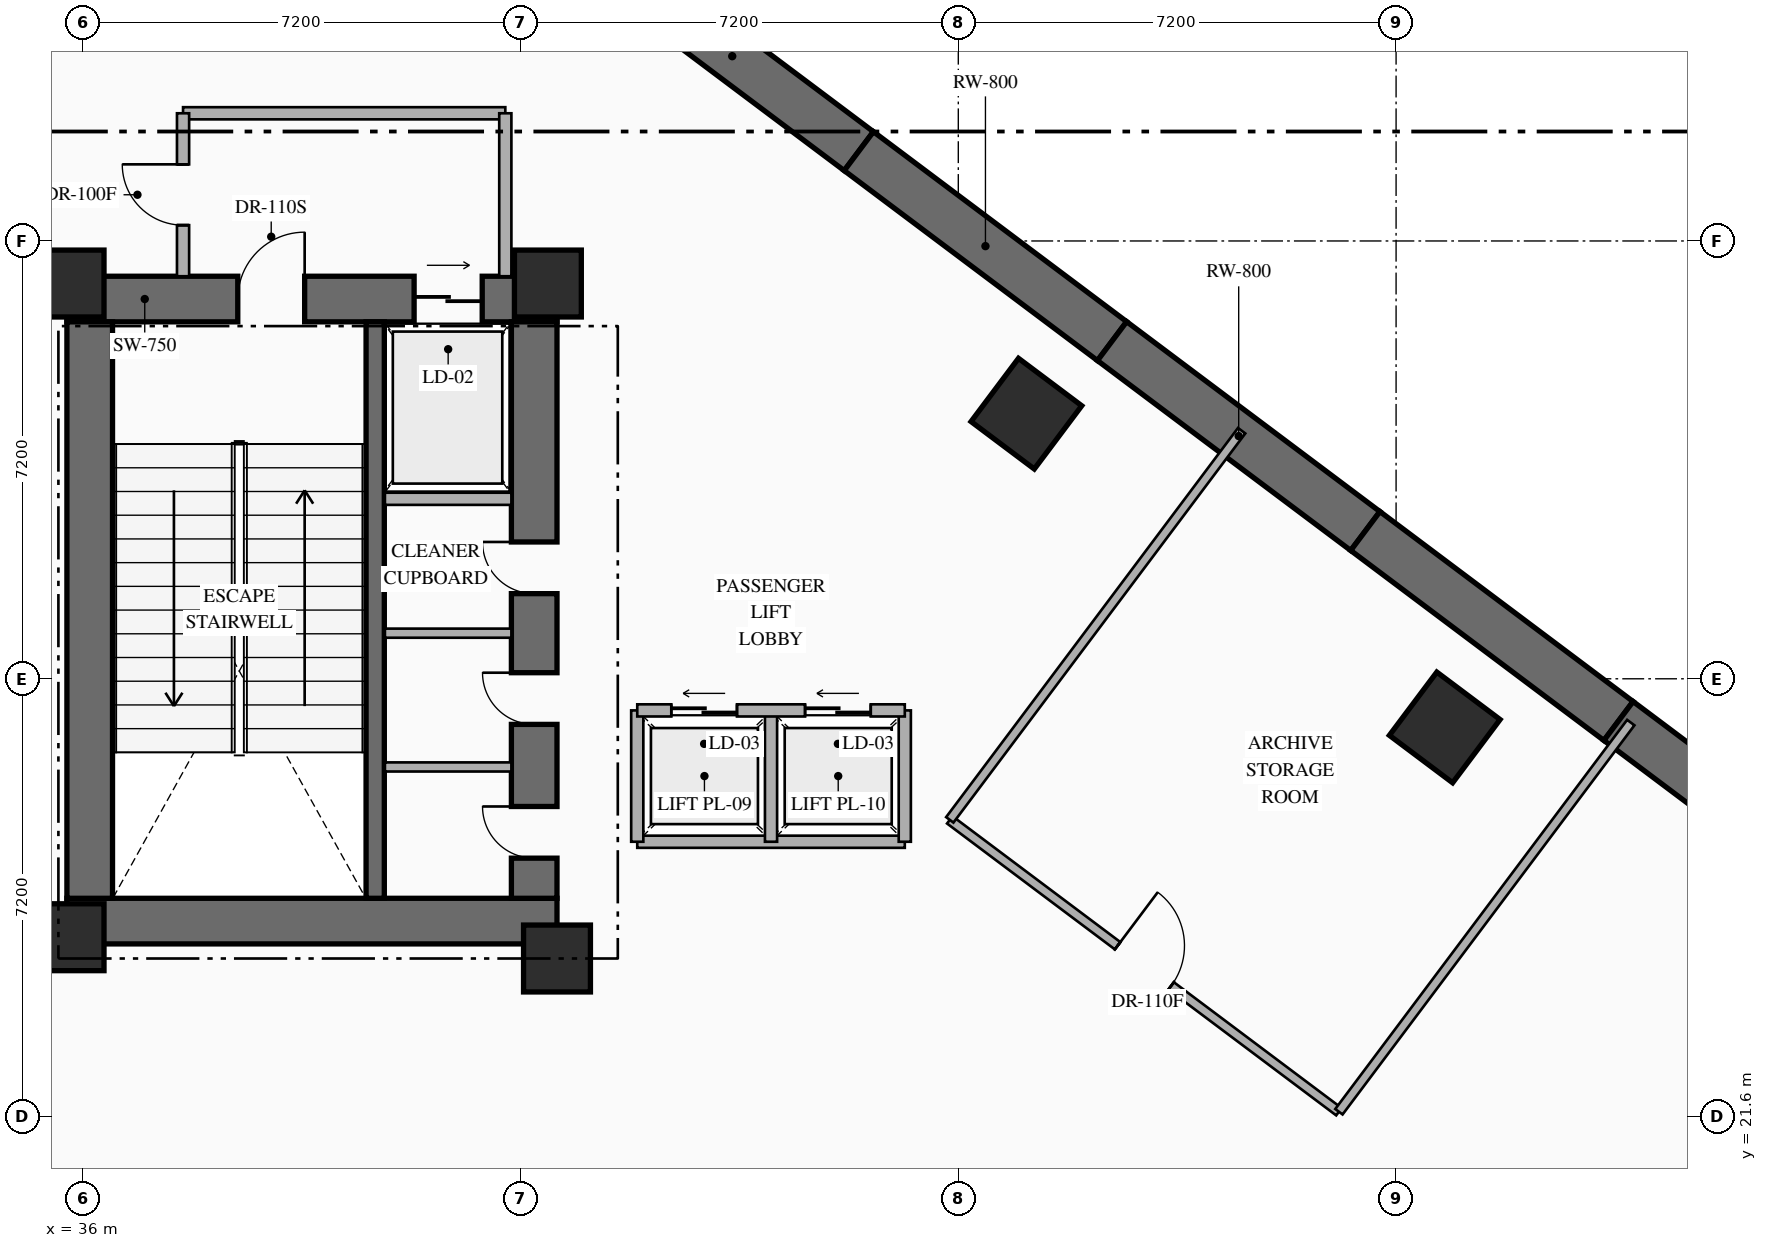
"""IFC4 building model, lengths in metres.
Left out: names, types, materials, properties, quantities, classifications, styles, units other than length and angle.
Written with IfcOpenShell. Run it as: python <this file> out.ifc"""

import sys

from ifc_helpers import new_model, si_unit, direction, frame, frame_2d, origin, origin_2d, place, context, subcontext, project, spatial, rectangle, extrude, element, fill, save


model = new_model("IFC4")
c1 = context("Model", 3, precision=1e-05, world=origin(), true_north=direction((0.0, 1.0)))
c2 = subcontext(c1, "Body", "Model", "MODEL_VIEW")
j1 = project(units=[si_unit("LENGTHUNIT", "METRE"), si_unit("PLANEANGLEUNIT", "RADIAN")], contexts=[c1])
p1 = place(None, origin())
s1 = spatial("IfcSite", under=j1, at=p1, CompositionType="ELEMENT")
p2 = place(p1, origin())
s2 = spatial("IfcBuilding", under=s1, at=p2, CompositionType="ELEMENT")
p3 = place(p2, frame((0.0, 0.0, -4.8)))
s3 = spatial("IfcBuildingStorey", under=s2, at=p3, CompositionType="ELEMENT", Elevation=-4.8)
p4 = place(p3, frame((35.74, 24.815, 0.0), z_axis=(0.0, 0.0, 1.0), x_axis=(1.0, 0.0, 0.0)))
e1 = element("IfcWall", 1, at=p4, inside=s3, PredefinedType="SHEAR", context=c2, shape_type="SweptSolid", body=[
    extrude(rectangle(XDim=8.06, YDim=0.75, at=frame_2d((4.03, 0.0))), origin(), (0.0, 0.0, 1.0), 4.8),
])
p5 = place(p3, frame((35.74, 35.045, 0.0), z_axis=(0.0, 0.0, 1.0), x_axis=(1.0, 0.0, 0.0)))
e2 = element("IfcWall", 2, at=p5, inside=s3, PredefinedType="SHEAR", context=c2, shape_type="SweptSolid", body=[
    extrude(rectangle(XDim=8.06, YDim=0.75, at=frame_2d((4.03, 0.0))), origin(), (0.0, 0.0, 1.0), 4.8),
])
p6 = place(p5, frame((2.81, 0.0, 0.0)))
e3 = element("IfcOpeningElement", 3, at=p6, cuts=e2, PredefinedType="OPENING", context=c2, shape_type="SweptSolid", body=[
    extrude(rectangle(XDim=1.1, YDim=2.2, at=frame_2d((0.55, 1.1))), frame((0.0, 0.385, 0.0), z_axis=(0.0, -1.0, 0.0), x_axis=(1.0, 0.0, 0.0)), (0.0, 0.0, 1.0), 0.77),
])
p7 = place(p5, frame((5.71, 0.0, 0.0)))
e4 = element("IfcOpeningElement", 4, at=p7, cuts=e2, PredefinedType="OPENING", context=c2, shape_type="SweptSolid", body=[
    extrude(rectangle(XDim=1.12, YDim=2.15, at=frame_2d((0.56, 1.075))), frame((0.0, 0.385, 0.0), z_axis=(0.0, -1.0, 0.0), x_axis=(1.0, 0.0, 0.0)), (0.0, 0.0, 1.0), 0.77),
])
p8 = place(p3, frame((36.115, 25.19, 0.0), z_axis=(0.0, 0.0, 1.0), x_axis=(0.0, 1.0, 0.0)))
e5 = element("IfcWall", 5, at=p8, inside=s3, PredefinedType="SHEAR", context=c2, shape_type="SweptSolid", body=[
    extrude(rectangle(XDim=9.48, YDim=0.75, at=frame_2d((4.74, 0.0))), origin(), (0.0, 0.0, 1.0), 4.8),
])
p9 = place(p3, frame((43.425, 25.19, 0.0), z_axis=(0.0, 0.0, 1.0), x_axis=(0.0, 1.0, 0.0)))
e6 = element("IfcWall", 6, at=p9, inside=s3, PredefinedType="SHEAR", context=c2, shape_type="SweptSolid", body=[
    extrude(rectangle(XDim=9.48, YDim=0.75, at=frame_2d((4.74, 0.0))), origin(), (0.0, 0.0, 1.0), 4.8),
])
p10 = place(p9, frame((0.66, 0.0, 0.0)))
e7 = element("IfcOpeningElement", 7, at=p10, cuts=e6, PredefinedType="OPENING", context=c2, shape_type="SweptSolid", body=[
    extrude(rectangle(XDim=0.85, YDim=2.08, at=frame_2d((0.425, 1.04))), frame((0.0, 0.385, 0.0), z_axis=(0.0, -1.0, 0.0), x_axis=(1.0, 0.0, 0.0)), (0.0, 0.0, 1.0), 0.77),
])
p11 = place(p9, frame((2.86, 0.0, 0.0)))
e8 = element("IfcOpeningElement", 8, at=p11, cuts=e6, PredefinedType="OPENING", context=c2, shape_type="SweptSolid", body=[
    extrude(rectangle(XDim=0.85, YDim=2.08, at=frame_2d((0.425, 1.04))), frame((0.0, 0.385, 0.0), z_axis=(0.0, -1.0, 0.0), x_axis=(1.0, 0.0, 0.0)), (0.0, 0.0, 1.0), 0.77),
])
p12 = place(p9, frame((5.01, 0.0, 0.0)))
e9 = element("IfcOpeningElement", 9, at=p12, cuts=e6, PredefinedType="OPENING", context=c2, shape_type="SweptSolid", body=[
    extrude(rectangle(XDim=0.85, YDim=2.08, at=frame_2d((0.425, 1.04))), frame((0.0, 0.385, 0.0), z_axis=(0.0, -1.0, 0.0), x_axis=(1.0, 0.0, 0.0)), (0.0, 0.0, 1.0), 0.77),
])
p13 = place(p3, frame((40.81, 25.19, 0.0), z_axis=(0.0, 0.0, 1.0), x_axis=(0.0, 1.0, 0.0)))
e10 = element("IfcWall", 10, at=p13, inside=s3, PredefinedType="SHEAR", context=c2, shape_type="SweptSolid", body=[
    extrude(rectangle(XDim=9.48, YDim=0.3, at=frame_2d((4.74, 0.0))), origin(), (0.0, 0.0, 1.0), 4.8),
])
p14 = place(p3, frame((44.6, 40.6, 0.0), z_axis=(0.0, 0.0, 1.0), x_axis=(0.799983113496, -0.600022514679, 0.0)))
e11 = element("IfcWall", 11, at=p14, inside=s3, PredefinedType="SHEAR", context=c2, shape_type="SweptSolid", body=[
    extrude(rectangle(XDim=5.205, YDim=0.8, at=frame_2d((2.603, 0.0))), origin(), (0.0, 0.0, 1.0), 4.5),
])
p15 = place(p3, frame((48.764, 37.477, 0.0), z_axis=(0.0, 0.0, 1.0), x_axis=(0.799977491278, -0.600030010457, 0.0)))
e12 = element("IfcWall", 12, at=p15, inside=s3, PredefinedType="SHEAR", context=c2, shape_type="SweptSolid", body=[
    extrude(rectangle(XDim=5.207, YDim=0.8, at=frame_2d((2.603, 0.0))), origin(), (0.0, 0.0, 1.0), 4.5),
])
p16 = place(p3, frame((52.929, 34.353, 0.0), z_axis=(0.0, 0.0, 1.0), x_axis=(0.80006752701, -0.59990995343, 0.0)))
e13 = element("IfcWall", 13, at=p16, inside=s3, PredefinedType="SHEAR", context=c2, shape_type="SweptSolid", body=[
    extrude(rectangle(XDim=5.206, YDim=0.8, at=frame_2d((2.603, 0.0))), origin(), (0.0, 0.0, 1.0), 4.5),
])
p17 = place(p3, frame((57.094, 31.23, 0.0), z_axis=(0.0, 0.0, 1.0), x_axis=(0.799909944843, -0.600120054773, 0.0)))
e14 = element("IfcWall", 14, at=p17, inside=s3, PredefinedType="SHEAR", context=c2, shape_type="SweptSolid", body=[
    extrude(rectangle(XDim=5.206, YDim=0.8, at=frame_2d((2.603, 0.0))), origin(), (0.0, 0.0, 1.0), 4.5),
])
p18 = place(p3, frame((61.258, 28.106, 0.0), z_axis=(0.0, 0.0, 1.0), x_axis=(0.8, -0.6, 0.0)))
e15 = element("IfcWall", 15, at=p18, inside=s3, PredefinedType="SHEAR", context=c2, shape_type="SweptSolid", body=[
    extrude(rectangle(XDim=5.205, YDim=0.8, at=frame_2d((2.603, 0.0))), origin(), (0.0, 0.0, 1.0), 4.5),
])
for number, where, z_axis, x_axis in (
    (16, (35.8, 24.55, 0.0), (0.0, 0.0, 1.0), (1.0, 0.0, 0.0)),
    (17, (43.8, 24.2, 0.0), (0.0, 0.0, 1.0), (1.0, 0.0, 0.0)),
    (18, (35.8, 35.3, 0.0), (0.0, 0.0, 1.0), (1.0, 0.0, 0.0)),
    (19, (43.65, 35.3, 0.0), (0.0, 0.0, 1.0), (1.0, 0.0, 0.0)),
):
    element("IfcColumn", number, at=place(p3, frame(where, z_axis=z_axis, x_axis=x_axis)), inside=s3, PredefinedType="COLUMN", context=c2, shape_type="SweptSolid", body=[
        extrude(rectangle(XDim=1.1, YDim=1.1, at=origin_2d()), origin(), (0.0, 0.0, 1.0), 4.8),
    ])
for number, where, z_axis, x_axis in (
    (20, (51.52, 33.16, 0.0), (0.0, 0.0, 1.0), (0.8, -0.6, 0.0)),
    (21, (58.4, 28.0, 0.0), (0.0, 0.0, 1.0), (0.8, -0.6, 0.0)),
):
    element("IfcColumn", number, at=place(p3, frame(where, z_axis=z_axis, x_axis=x_axis)), inside=s3, PredefinedType="COLUMN", context=c2, shape_type="SweptSolid", body=[
        extrude(rectangle(XDim=1.3, YDim=1.3, at=origin_2d()), origin(), (0.0, 0.0, 1.0), 4.8),
    ])
p19 = place(p3, frame((40.97, 31.76, 0.0), z_axis=(0.0, 0.0, 1.0), x_axis=(1.0, 0.0, 0.0)))
e22 = element("IfcWall", 22, at=p19, inside=s3, PredefinedType="STANDARD", context=c2, shape_type="SweptSolid", body=[
    extrude(rectangle(XDim=2.08, YDim=0.2, at=frame_2d((1.04, 0.0))), origin(), (0.0, 0.0, 1.0), 4.5),
])
for number, where, z_axis, x_axis in (
    (23, (40.97, 27.35, 0.0), (0.0, 0.0, 1.0), (1.0, 0.0, 0.0)),
    (24, (40.97, 29.55, 0.0), (0.0, 0.0, 1.0), (1.0, 0.0, 0.0)),
):
    element("IfcWall", number, at=place(p3, frame(where, z_axis=z_axis, x_axis=x_axis)), inside=s3, PredefinedType="PARTITIONING", context=c2, shape_type="SweptSolid", body=[
        extrude(rectangle(XDim=2.08, YDim=0.15, at=frame_2d((1.04, 0.0))), origin(), (0.0, 0.0, 1.0), 4.5),
    ])
p20 = place(p3, frame((37.65, 38.1, 0.0), z_axis=(0.0, 0.0, 1.0), x_axis=(1.0, 0.0, 0.0)))
e25 = element("IfcWall", 25, at=p20, inside=s3, PredefinedType="STANDARD", context=c2, shape_type="SweptSolid", body=[
    extrude(rectangle(XDim=5.3, YDim=0.2, at=frame_2d((2.65, 0.0))), origin(), (0.0, 0.0, 1.0), 4.5),
])
p21 = place(p3, frame((42.95, 35.42, 0.0), z_axis=(0.0, 0.0, 1.0), x_axis=(0.0, 1.0, 0.0)))
e26 = element("IfcWall", 26, at=p21, inside=s3, PredefinedType="STANDARD", context=c2, shape_type="SweptSolid", body=[
    extrude(rectangle(XDim=2.68, YDim=0.2, at=frame_2d((1.34, 0.0))), origin(), (0.0, 0.0, 1.0), 4.5),
])
p22 = place(p3, frame((37.65, 35.42, 0.0), z_axis=(0.0, 0.0, 1.0), x_axis=(0.0, 1.0, 0.0)))
e27 = element("IfcWall", 27, at=p22, inside=s3, PredefinedType="STANDARD", context=c2, shape_type="SweptSolid", body=[
    extrude(rectangle(XDim=2.68, YDim=0.2, at=frame_2d((1.34, 0.0))), origin(), (0.0, 0.0, 1.0), 4.5),
])
p23 = place(p22, frame((0.84, 0.0, 0.0)))
e28 = element("IfcOpeningElement", 28, at=p23, cuts=e27, PredefinedType="OPENING", context=c2, shape_type="SweptSolid", body=[
    extrude(rectangle(XDim=1.0, YDim=2.2, at=frame_2d((0.5, 1.1))), frame((0.0, 0.11, 0.0), z_axis=(0.0, -1.0, 0.0), x_axis=(1.0, 0.0, 0.0)), (0.0, 0.0, 1.0), 0.22),
])
p24 = place(p3, frame((45.12, 26.12, 0.0), z_axis=(0.0, 0.0, 1.0), x_axis=(1.0, 0.0, 0.0)))
e29 = element("IfcWall", 29, at=p24, inside=s3, PredefinedType="STANDARD", context=c2, shape_type="SweptSolid", body=[
    extrude(rectangle(XDim=4.4, YDim=0.2, at=frame_2d((2.2, 0.0))), origin(), (0.0, 0.0, 1.0), 4.5),
])
for number, where, z_axis, x_axis in (
    (30, (45.12, 26.12, 0.0), (0.0, 0.0, 1.0), (0.0, 1.0, 0.0)),
    (31, (49.52, 26.12, 0.0), (0.0, 0.0, 1.0), (0.0, 1.0, 0.0)),
    (32, (47.32, 26.12, 0.0), (0.0, 0.0, 1.0), (0.0, 1.0, 0.0)),
):
    element("IfcWall", number, at=place(p3, frame(where, z_axis=z_axis, x_axis=x_axis)), inside=s3, PredefinedType="STANDARD", context=c2, shape_type="SweptSolid", body=[
        extrude(rectangle(XDim=2.16, YDim=0.2, at=frame_2d((1.08, 0.0))), origin(), (0.0, 0.0, 1.0), 4.5),
    ])
p25 = place(p3, frame((45.12, 28.28, 0.0), z_axis=(0.0, 0.0, 1.0), x_axis=(1.0, 0.0, 0.0)))
e33 = element("IfcWall", 33, at=p25, inside=s3, PredefinedType="STANDARD", context=c2, shape_type="SweptSolid", body=[
    extrude(rectangle(XDim=4.4, YDim=0.2, at=frame_2d((2.2, 0.0))), origin(), (0.0, 0.0, 1.0), 4.5),
])
p26 = place(p25, frame((0.56, 0.0, 0.0)))
e34 = element("IfcOpeningElement", 34, at=p26, cuts=e33, PredefinedType="OPENING", context=c2, shape_type="SweptSolid", body=[
    extrude(rectangle(XDim=1.08, YDim=2.15, at=frame_2d((0.54, 1.075))), frame((0.0, 0.11, 0.0), z_axis=(0.0, -1.0, 0.0), x_axis=(1.0, 0.0, 0.0)), (0.0, 0.0, 1.0), 0.22),
])
p27 = place(p25, frame((2.76, 0.0, 0.0)))
e35 = element("IfcOpeningElement", 35, at=p27, cuts=e33, PredefinedType="OPENING", context=c2, shape_type="SweptSolid", body=[
    extrude(rectangle(XDim=1.08, YDim=2.15, at=frame_2d((0.54, 1.075))), frame((0.0, 0.11, 0.0), z_axis=(0.0, -1.0, 0.0), x_axis=(1.0, 0.0, 0.0)), (0.0, 0.0, 1.0), 0.22),
])
p28 = place(p3, frame((50.26, 26.48, 0.0), z_axis=(0.0, 0.0, 1.0), x_axis=(0.799992675677, -0.60000976564, 0.0)))
e36 = element("IfcWall", 36, at=p28, inside=s3, PredefinedType="PARTITIONING", context=c2, shape_type="SweptSolid", body=[
    extrude(rectangle(XDim=8.0, YDim=0.15, at=frame_2d((4.0, 0.0))), origin(), (0.0, 0.0, 1.0), 4.095),
])
p29 = place(p28, frame((3.45, 0.0, 0.0)))
e37 = element("IfcOpeningElement", 37, at=p29, cuts=e36, PredefinedType="OPENING", context=c2, shape_type="SweptSolid", body=[
    extrude(rectangle(XDim=1.1, YDim=2.24, at=frame_2d((0.55, 1.12))), frame((0.0, 0.085, 0.0), z_axis=(0.0, -1.0, 0.0), x_axis=(1.0, 0.0, 0.0)), (0.0, 0.0, 1.0), 0.17),
])
p30 = place(p3, frame((50.26, 26.48, 0.0), z_axis=(0.0, 0.0, 1.0), x_axis=(0.60000976564, 0.799992675677, 0.0)))
e38 = element("IfcWall", 38, at=p30, inside=s3, PredefinedType="PARTITIONING", context=c2, shape_type="SweptSolid", body=[
    extrude(rectangle(XDim=8.0, YDim=0.15, at=frame_2d((4.0, 0.0))), origin(), (0.0, 0.0, 1.0), 4.5),
])
p31 = place(p3, frame((56.66, 21.68, 0.0), z_axis=(0.0, 0.0, 1.0), x_axis=(0.599995117266, 0.800003662027, 0.0)))
e39 = element("IfcWall", 39, at=p31, inside=s3, PredefinedType="PARTITIONING", context=c2, shape_type="SweptSolid", body=[
    extrude(rectangle(XDim=8.0, YDim=0.15, at=frame_2d((4.0, 0.0))), origin(), (0.0, 0.0, 1.0), 4.5),
])
p32 = place(p6, origin())
e40 = element("IfcDoor", 40, at=p32, inside=s3, OperationType="SINGLE_SWING_RIGHT", PredefinedType="DOOR", context=c2, shape_type="SweptSolid", body=[
    extrude(rectangle(XDim=1.1, YDim=2.2, at=frame_2d((0.55, 1.1))), frame((0.0, 0.025, 0.0), z_axis=(0.0, -1.0, 0.0), x_axis=(1.0, 0.0, 0.0)), (0.0, 0.0, 1.0), 0.05),
])
fill(e3, e40)
p33 = place(p7, origin())
e41 = element("IfcDoor", 41, at=p33, inside=s3, OperationType="SLIDING_TO_RIGHT", PredefinedType="USERDEFINED", context=c2, shape_type="SweptSolid", body=[
    extrude(rectangle(XDim=1.12, YDim=2.15, at=frame_2d((0.56, 1.075))), frame((0.0, 0.025, 0.0), z_axis=(0.0, -1.0, 0.0), x_axis=(1.0, 0.0, 0.0)), (0.0, 0.0, 1.0), 0.05),
])
fill(e4, e41)
p34 = place(p10, origin())
e42 = element("IfcDoor", 42, at=p34, inside=s3, OperationType="SINGLE_SWING_RIGHT", PredefinedType="DOOR", context=c2, shape_type="SweptSolid", body=[
    extrude(rectangle(XDim=0.85, YDim=2.08, at=frame_2d((0.425, 1.04))), frame((0.0, 0.025, 0.0), z_axis=(0.0, -1.0, 0.0), x_axis=(1.0, 0.0, 0.0)), (0.0, 0.0, 1.0), 0.05),
])
fill(e7, e42)
p35 = place(p11, origin())
e43 = element("IfcDoor", 43, at=p35, inside=s3, OperationType="SINGLE_SWING_RIGHT", PredefinedType="DOOR", context=c2, shape_type="SweptSolid", body=[
    extrude(rectangle(XDim=0.85, YDim=2.08, at=frame_2d((0.425, 1.04))), frame((0.0, 0.025, 0.0), z_axis=(0.0, -1.0, 0.0), x_axis=(1.0, 0.0, 0.0)), (0.0, 0.0, 1.0), 0.05),
])
fill(e8, e43)
p36 = place(p12, origin())
e44 = element("IfcDoor", 44, at=p36, inside=s3, OperationType="SINGLE_SWING_RIGHT", PredefinedType="DOOR", context=c2, shape_type="SweptSolid", body=[
    extrude(rectangle(XDim=0.85, YDim=2.08, at=frame_2d((0.425, 1.04))), frame((0.0, 0.025, 0.0), z_axis=(0.0, -1.0, 0.0), x_axis=(1.0, 0.0, 0.0)), (0.0, 0.0, 1.0), 0.05),
])
fill(e9, e44)
p37 = place(p23, origin())
e45 = element("IfcDoor", 45, at=p37, inside=s3, OperationType="SINGLE_SWING_RIGHT", PredefinedType="DOOR", context=c2, shape_type="SweptSolid", body=[
    extrude(rectangle(XDim=1.0, YDim=2.2, at=frame_2d((0.5, 1.1))), frame((0.0, 0.025, 0.0), z_axis=(0.0, -1.0, 0.0), x_axis=(1.0, 0.0, 0.0)), (0.0, 0.0, 1.0), 0.05),
])
fill(e28, e45)
p38 = place(p26, origin())
e46 = element("IfcDoor", 46, at=p38, inside=s3, OperationType="SLIDING_TO_LEFT", PredefinedType="USERDEFINED", context=c2, shape_type="SweptSolid", body=[
    extrude(rectangle(XDim=1.08, YDim=2.15, at=frame_2d((0.54, 1.075))), frame((0.0, 0.025, 0.0), z_axis=(0.0, -1.0, 0.0), x_axis=(1.0, 0.0, 0.0)), (0.0, 0.0, 1.0), 0.05),
])
fill(e34, e46)
p39 = place(p27, origin())
e47 = element("IfcDoor", 47, at=p39, inside=s3, OperationType="SLIDING_TO_LEFT", PredefinedType="USERDEFINED", context=c2, shape_type="SweptSolid", body=[
    extrude(rectangle(XDim=1.08, YDim=2.15, at=frame_2d((0.54, 1.075))), frame((0.0, 0.025, 0.0), z_axis=(0.0, -1.0, 0.0), x_axis=(1.0, 0.0, 0.0)), (0.0, 0.0, 1.0), 0.05),
])
fill(e35, e47)
p40 = place(p29, origin())
e48 = element("IfcDoor", 48, at=p40, inside=s3, OperationType="SINGLE_SWING_LEFT", PredefinedType="DOOR", context=c2, shape_type="SweptSolid", body=[
    extrude(rectangle(XDim=1.1, YDim=2.24, at=frame_2d((0.55, 1.12))), frame((0.0, 0.025, 0.0), z_axis=(0.0, -1.0, 0.0), x_axis=(1.0, 0.0, 0.0)), (0.0, 0.0, 1.0), 0.05),
])
fill(e37, e48)
save(model, sys.argv[1])
